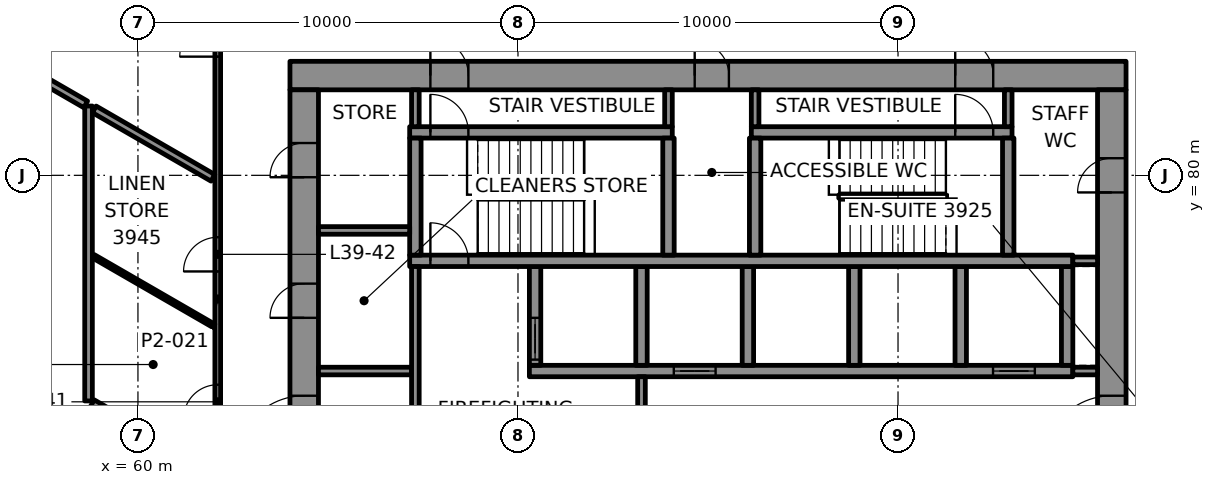
"""IFC4 building model, lengths in metres.
Left out: names, types, materials, properties, quantities, classifications, styles, units other than length and angle.
Written with IfcOpenShell. Run it as: python <this file> out.ifc"""

import sys

from ifc_helpers import new_model, si_unit, direction, frame, frame_2d, origin, place, context, subcontext, project, spatial, rectangle, extrude, element, fill, save


model = new_model("IFC4")
c1 = context("Model", 3, precision=1e-05, world=origin(), true_north=direction((0.0, 1.0)))
c2 = subcontext(c1, "Body", "Model", "MODEL_VIEW")
j1 = project(units=[si_unit("LENGTHUNIT", "METRE"), si_unit("PLANEANGLEUNIT", "RADIAN")], contexts=[c1])
p1 = place(None, origin())
s1 = spatial("IfcSite", under=j1, at=p1, CompositionType="ELEMENT")
p2 = place(p1, origin())
s2 = spatial("IfcBuilding", under=s1, at=p2, CompositionType="ELEMENT")
p3 = place(p2, frame((0.0, 0.0, 171.4)))
s3 = spatial("IfcBuildingStorey", under=s2, at=p3, CompositionType="ELEMENT", Elevation=171.4)
p4 = place(p3, frame((64.0, 82.625, 0.0), z_axis=(0.0, 0.0, 1.0), x_axis=(1.0, 0.0, 0.0)))
e1 = element("IfcWall", 1, at=p4, inside=s3, PredefinedType="SHEAR", context=c2, shape_type="SweptSolid", body=[
    extrude(rectangle(XDim=22.0, YDim=0.75, at=frame_2d((11.0, 0.0))), origin(), (0.0, 0.0, 1.0), 3.7),
])
p5 = place(p4, frame((3.695, 0.0, 0.0)))
e2 = element("IfcOpeningElement", 2, at=p5, cuts=e1, PredefinedType="OPENING", context=c2, shape_type="SweptSolid", body=[
    extrude(rectangle(XDim=1.0, YDim=2.1, at=frame_2d((0.5, 1.05))), frame((0.0, 0.385, 0.0), z_axis=(0.0, -1.0, 0.0), x_axis=(1.0, 0.0, 0.0)), (0.0, 0.0, 1.0), 0.77),
])
p6 = place(p4, frame((17.505, 0.0, 0.0)))
e3 = element("IfcOpeningElement", 3, at=p6, cuts=e1, PredefinedType="OPENING", context=c2, shape_type="SweptSolid", body=[
    extrude(rectangle(XDim=1.0, YDim=2.1, at=frame_2d((0.5, 1.05))), frame((0.0, 0.385, 0.0), z_axis=(0.0, -1.0, 0.0), x_axis=(1.0, 0.0, 0.0)), (0.0, 0.0, 1.0), 0.77),
])
p7 = place(p4, frame((10.65, 0.0, 0.0)))
e4 = element("IfcOpeningElement", 4, at=p7, cuts=e1, PredefinedType="OPENING", context=c2, shape_type="SweptSolid", body=[
    extrude(rectangle(XDim=0.9, YDim=2.1, at=frame_2d((0.45, 1.05))), frame((0.0, 0.385, 0.0), z_axis=(0.0, -1.0, 0.0), x_axis=(1.0, 0.0, 0.0)), (0.0, 0.0, 1.0), 0.77),
])
p8 = place(p3, frame((64.375, 67.75, 0.0), z_axis=(0.0, 0.0, 1.0), x_axis=(0.0, 1.0, 0.0)))
e5 = element("IfcWall", 5, at=p8, inside=s3, PredefinedType="SHEAR", context=c2, shape_type="SweptSolid", body=[
    extrude(rectangle(XDim=14.5, YDim=0.75, at=frame_2d((7.25, 0.0))), origin(), (0.0, 0.0, 1.0), 3.7),
])
p9 = place(p8, frame((4.65, 0.0, 0.0)))
e6 = element("IfcOpeningElement", 6, at=p9, cuts=e5, PredefinedType="OPENING", context=c2, shape_type="SweptSolid", body=[
    extrude(rectangle(XDim=1.8, YDim=2.1, at=frame_2d((0.9, 1.05))), frame((0.0, 0.385, 0.0), z_axis=(0.0, -1.0, 0.0), x_axis=(1.0, 0.0, 0.0)), (0.0, 0.0, 1.0), 0.77),
])
p10 = place(p8, frame((8.5, 0.0, 0.0)))
e7 = element("IfcOpeningElement", 7, at=p10, cuts=e5, PredefinedType="OPENING", context=c2, shape_type="SweptSolid", body=[
    extrude(rectangle(XDim=0.9, YDim=2.1, at=frame_2d((0.45, 1.05))), frame((0.0, 0.385, 0.0), z_axis=(0.0, -1.0, 0.0), x_axis=(1.0, 0.0, 0.0)), (0.0, 0.0, 1.0), 0.77),
])
p11 = place(p8, frame((12.2, 0.0, 0.0)))
e8 = element("IfcOpeningElement", 8, at=p11, cuts=e5, PredefinedType="OPENING", context=c2, shape_type="SweptSolid", body=[
    extrude(rectangle(XDim=0.9, YDim=2.1, at=frame_2d((0.45, 1.05))), frame((0.0, 0.385, 0.0), z_axis=(0.0, -1.0, 0.0), x_axis=(1.0, 0.0, 0.0)), (0.0, 0.0, 1.0), 0.77),
])
p12 = place(p3, frame((85.625, 67.75, 0.0), z_axis=(0.0, 0.0, 1.0), x_axis=(0.0, 1.0, 0.0)))
e9 = element("IfcWall", 9, at=p12, inside=s3, PredefinedType="SHEAR", context=c2, shape_type="SweptSolid", body=[
    extrude(rectangle(XDim=14.5, YDim=0.75, at=frame_2d((7.25, 0.0))), origin(), (0.0, 0.0, 1.0), 3.7),
])
p13 = place(p12, frame((4.65, 0.0, 0.0)))
e10 = element("IfcOpeningElement", 10, at=p13, cuts=e9, PredefinedType="OPENING", context=c2, shape_type="SweptSolid", body=[
    extrude(rectangle(XDim=1.8, YDim=2.1, at=frame_2d((0.9, 1.05))), frame((0.0, 0.385, 0.0), z_axis=(0.0, -1.0, 0.0), x_axis=(1.0, 0.0, 0.0)), (0.0, 0.0, 1.0), 0.77),
])
p14 = place(p12, frame((11.8, 0.0, 0.0)))
e11 = element("IfcOpeningElement", 11, at=p14, cuts=e9, PredefinedType="OPENING", context=c2, shape_type="SweptSolid", body=[
    extrude(rectangle(XDim=0.9, YDim=2.1, at=frame_2d((0.45, 1.05))), frame((0.0, 0.385, 0.0), z_axis=(0.0, -1.0, 0.0), x_axis=(1.0, 0.0, 0.0)), (0.0, 0.0, 1.0), 0.77),
])
p15 = place(p3, frame((70.3, 74.85, 0.0), z_axis=(0.0, 0.0, 1.0), x_axis=(1.0, 0.0, 0.0)))
e12 = element("IfcWall", 12, at=p15, inside=s3, PredefinedType="SHEAR", context=c2, shape_type="SweptSolid", body=[
    extrude(rectangle(XDim=14.3, YDim=0.3, at=frame_2d((7.15, 0.0))), origin(), (0.0, 0.0, 1.0), 3.7),
])
p16 = place(p15, frame((3.8, 0.0, 0.0)))
e13 = element("IfcOpeningElement", 13, at=p16, cuts=e12, PredefinedType="OPENING", context=c2, shape_type="SweptSolid", body=[
    extrude(rectangle(XDim=1.1, YDim=2.1, at=frame_2d((0.55, 1.05))), frame((0.0, 0.16, 0.0), z_axis=(0.0, -1.0, 0.0), x_axis=(1.0, 0.0, 0.0)), (0.0, 0.0, 1.0), 0.32),
])
p17 = place(p15, frame((12.2, 0.0, 0.0)))
e14 = element("IfcOpeningElement", 14, at=p17, cuts=e12, PredefinedType="OPENING", context=c2, shape_type="SweptSolid", body=[
    extrude(rectangle(XDim=1.1, YDim=2.1, at=frame_2d((0.55, 1.05))), frame((0.0, 0.16, 0.0), z_axis=(0.0, -1.0, 0.0), x_axis=(1.0, 0.0, 0.0)), (0.0, 0.0, 1.0), 0.32),
])
p18 = place(p3, frame((70.45, 75.0, 0.0), z_axis=(0.0, 0.0, 1.0), x_axis=(0.0, 1.0, 0.0)))
e15 = element("IfcWall", 15, at=p18, inside=s3, PredefinedType="SHEAR", context=c2, shape_type="SweptSolid", body=[
    extrude(rectangle(XDim=2.6, YDim=0.3, at=frame_2d((1.3, 0.0))), origin(), (0.0, 0.0, 1.0), 3.7),
])
p19 = place(p18, frame((0.15, 0.0, 0.0)))
e16 = element("IfcOpeningElement", 16, at=p19, cuts=e15, PredefinedType="OPENING", context=c2, shape_type="SweptSolid", body=[
    extrude(rectangle(XDim=1.1, YDim=2.1, at=frame_2d((0.55, 1.05))), frame((0.0, 0.16, 0.0), z_axis=(0.0, -1.0, 0.0), x_axis=(1.0, 0.0, 0.0)), (0.0, 0.0, 1.0), 0.32),
])
for number, where, z_axis, x_axis in (
    (17, (73.25, 75.0, 0.0), (0.0, 0.0, 1.0), (0.0, 1.0, 0.0)),
    (18, (76.05, 75.0, 0.0), (0.0, 0.0, 1.0), (0.0, 1.0, 0.0)),
    (19, (78.85, 75.0, 0.0), (0.0, 0.0, 1.0), (0.0, 1.0, 0.0)),
    (20, (81.65, 75.0, 0.0), (0.0, 0.0, 1.0), (0.0, 1.0, 0.0)),
    (21, (84.45, 75.0, 0.0), (0.0, 0.0, 1.0), (0.0, 1.0, 0.0)),
):
    element("IfcWall", number, at=place(p3, frame(where, z_axis=z_axis, x_axis=x_axis)), inside=s3, PredefinedType="SHEAR", context=c2, shape_type="SweptSolid", body=[
        extrude(rectangle(XDim=2.6, YDim=0.3, at=frame_2d((1.3, 0.0))), origin(), (0.0, 0.0, 1.0), 3.7),
    ])
p20 = place(p3, frame((67.15, 77.75, 0.0), z_axis=(0.0, 0.0, 1.0), x_axis=(1.0, 0.0, 0.0)))
e22 = element("IfcWall", 22, at=p20, inside=s3, PredefinedType="SHEAR", context=c2, shape_type="SweptSolid", body=[
    extrude(rectangle(XDim=17.45, YDim=0.3, at=frame_2d((8.725, 0.0))), origin(), (0.0, 0.0, 1.0), 3.7),
])
p21 = place(p20, frame((0.545, 0.0, 0.0)))
e23 = element("IfcOpeningElement", 23, at=p21, cuts=e22, PredefinedType="OPENING", context=c2, shape_type="SweptSolid", body=[
    extrude(rectangle(XDim=1.0, YDim=2.1, at=frame_2d((0.5, 1.05))), frame((0.0, 0.16, 0.0), z_axis=(0.0, -1.0, 0.0), x_axis=(1.0, 0.0, 0.0)), (0.0, 0.0, 1.0), 0.32),
])
p22 = place(p3, frame((67.15, 81.13, 0.0), z_axis=(0.0, 0.0, 1.0), x_axis=(1.0, 0.0, 0.0)))
e24 = element("IfcWall", 24, at=p22, inside=s3, PredefinedType="SHEAR", context=c2, shape_type="SweptSolid", body=[
    extrude(rectangle(XDim=6.91, YDim=0.3, at=frame_2d((3.455, 0.0))), origin(), (0.0, 0.0, 1.0), 3.7),
])
p23 = place(p22, frame((0.545, 0.0, 0.0)))
e25 = element("IfcOpeningElement", 25, at=p23, cuts=e24, PredefinedType="OPENING", context=c2, shape_type="SweptSolid", body=[
    extrude(rectangle(XDim=1.0, YDim=2.1, at=frame_2d((0.5, 1.05))), frame((0.0, 0.16, 0.0), z_axis=(0.0, -1.0, 0.0), x_axis=(1.0, 0.0, 0.0)), (0.0, 0.0, 1.0), 0.32),
])
p24 = place(p3, frame((76.14, 81.13, 0.0), z_axis=(0.0, 0.0, 1.0), x_axis=(1.0, 0.0, 0.0)))
e26 = element("IfcWall", 26, at=p24, inside=s3, PredefinedType="SHEAR", context=c2, shape_type="SweptSolid", body=[
    extrude(rectangle(XDim=6.86, YDim=0.3, at=frame_2d((3.43, 0.0))), origin(), (0.0, 0.0, 1.0), 3.7),
])
p25 = place(p24, frame((5.365, 0.0, 0.0)))
e27 = element("IfcOpeningElement", 27, at=p25, cuts=e26, PredefinedType="OPENING", context=c2, shape_type="SweptSolid", body=[
    extrude(rectangle(XDim=1.0, YDim=2.1, at=frame_2d((0.5, 1.05))), frame((0.0, 0.16, 0.0), z_axis=(0.0, -1.0, 0.0), x_axis=(1.0, 0.0, 0.0)), (0.0, 0.0, 1.0), 0.32),
])
for number, where, z_axis, x_axis in (
    (28, (67.3, 77.9, 0.0), (0.0, 0.0, 1.0), (0.0, 1.0, 0.0)),
    (29, (73.96, 77.9, 0.0), (0.0, 0.0, 1.0), (0.0, 1.0, 0.0)),
    (30, (76.24, 77.9, 0.0), (0.0, 0.0, 1.0), (0.0, 1.0, 0.0)),
    (31, (82.9, 77.9, 0.0), (0.0, 0.0, 1.0), (0.0, 1.0, 0.0)),
):
    element("IfcWall", number, at=place(p3, frame(where, z_axis=z_axis, x_axis=x_axis)), inside=s3, PredefinedType="SHEAR", context=c2, shape_type="SweptSolid", body=[
        extrude(rectangle(XDim=3.08, YDim=0.3, at=frame_2d((1.54, 0.0))), origin(), (0.0, 0.0, 1.0), 3.7),
    ])
p26 = place(p3, frame((62.1, 68.591, 0.0), z_axis=(0.0, 0.0, 1.0), x_axis=(0.0, 1.0, 0.0)))
e32 = element("IfcWall", 32, at=p26, inside=s3, PredefinedType="PARTITIONING", context=c2, shape_type="SweptSolid", body=[
    extrude(rectangle(XDim=16.308, YDim=0.15, at=frame_2d((8.154, 0.0))), origin(), (0.0, 0.0, 1.0), 3.1),
])
p27 = place(p26, frame((4.999, 0.0, 0.0)))
e33 = element("IfcOpeningElement", 33, at=p27, cuts=e32, PredefinedType="OPENING", context=c2, shape_type="SweptSolid", body=[
    extrude(rectangle(XDim=0.9, YDim=2.1, at=frame_2d((0.45, 1.05))), frame((0.0, 0.085, 0.0), z_axis=(0.0, -1.0, 0.0), x_axis=(1.0, 0.0, 0.0)), (0.0, 0.0, 1.0), 0.17),
])
p28 = place(p26, frame((8.879, 0.0, 0.0)))
e34 = element("IfcOpeningElement", 34, at=p28, cuts=e32, PredefinedType="OPENING", context=c2, shape_type="SweptSolid", body=[
    extrude(rectangle(XDim=0.9, YDim=2.1, at=frame_2d((0.45, 1.05))), frame((0.0, 0.085, 0.0), z_axis=(0.0, -1.0, 0.0), x_axis=(1.0, 0.0, 0.0)), (0.0, 0.0, 1.0), 0.17),
])
p29 = place(p26, frame((14.532, 0.0, 0.0)))
e35 = element("IfcOpeningElement", 35, at=p29, cuts=e32, PredefinedType="OPENING", context=c2, shape_type="SweptSolid", body=[
    extrude(rectangle(XDim=1.0, YDim=2.1, at=frame_2d((0.5, 1.05))), frame((0.0, 0.085, 0.0), z_axis=(0.0, -1.0, 0.0), x_axis=(1.0, 0.0, 0.0)), (0.0, 0.0, 1.0), 0.17),
])
p30 = place(p3, frame((58.7, 74.063, 0.0), z_axis=(0.0, 0.0, 1.0), x_axis=(0.0, 1.0, 0.0)))
e36 = element("IfcWall", 36, at=p30, inside=s3, PredefinedType="PARTITIONING", context=c2, shape_type="SweptSolid", body=[
    extrude(rectangle(XDim=7.76, YDim=0.2, at=frame_2d((3.88, 0.0))), origin(), (0.0, 0.0, 1.0), 3.1),
])
p31 = place(p3, frame((61.973, 79.934, 0.0), z_axis=(0.0, 0.0, 1.0), x_axis=(-0.866022099498, 0.500005723148, 0.0)))
e37 = element("IfcWall", 37, at=p31, inside=s3, PredefinedType="PARTITIONING", context=c2, shape_type="SweptSolid", body=[
    extrude(rectangle(XDim=3.606, YDim=0.2, at=frame_2d((1.803, 0.0))), origin(), (0.0, 0.0, 1.0), 3.1),
])
p32 = place(p3, frame((61.999, 76.039, 0.0), z_axis=(0.0, 0.0, 1.0), x_axis=(-0.866020252061, 0.500008922941, 0.0)))
e38 = element("IfcWall", 38, at=p32, inside=s3, PredefinedType="PARTITIONING", context=c2, shape_type="SweptSolid", body=[
    extrude(rectangle(XDim=3.664, YDim=0.1, at=frame_2d((1.832, 0.0))), origin(), (0.0, 0.0, 1.0), 3.1),
])
p33 = place(p3, frame((61.973, 72.173, 0.0), z_axis=(0.0, 0.0, 1.0), x_axis=(-0.866049104564, 0.499958946799, 0.0)))
e39 = element("IfcWall", 39, at=p33, inside=s3, PredefinedType="PARTITIONING", context=c2, shape_type="SweptSolid", body=[
    extrude(rectangle(XDim=3.664, YDim=0.2, at=frame_2d((1.832, 0.0))), origin(), (0.0, 0.0, 1.0), 3.1),
])
p34 = place(p3, frame((58.625, 81.867, 0.0), z_axis=(0.0, 0.0, 1.0), x_axis=(-0.866078449842, 0.499908110276, 0.0)))
e40 = element("IfcWall", 40, at=p34, inside=s3, PredefinedType="PARTITIONING", context=c2, shape_type="SweptSolid", body=[
    extrude(rectangle(XDim=2.125, YDim=0.2, at=frame_2d((1.062, 0.0))), origin(), (0.0, 0.0, 1.0), 3.022),
])
p35 = place(p3, frame((64.75, 74.85, 0.0), z_axis=(0.0, 0.0, 1.0), x_axis=(1.0, 0.0, 0.0)))
e41 = element("IfcWall", 41, at=p35, inside=s3, PredefinedType="PARTITIONING", context=c2, shape_type="SweptSolid", body=[
    extrude(rectangle(XDim=2.45, YDim=0.2, at=frame_2d((1.225, 0.0))), origin(), (0.0, 0.0, 1.0), 3.7),
])
for number, where, z_axis, x_axis in (
    (42, (84.6, 74.85, 0.0), (0.0, 0.0, 1.0), (1.0, 0.0, 0.0)),
    (43, (84.6, 77.75, 0.0), (0.0, 0.0, 1.0), (1.0, 0.0, 0.0)),
):
    element("IfcWall", number, at=place(p3, frame(where, z_axis=z_axis, x_axis=x_axis)), inside=s3, PredefinedType="PARTITIONING", context=c2, shape_type="SweptSolid", body=[
        extrude(rectangle(XDim=0.65, YDim=0.2, at=frame_2d((0.325, 0.0))), origin(), (0.0, 0.0, 1.0), 3.7),
    ])
p36 = place(p3, frame((64.75, 78.55, 0.0), z_axis=(0.0, 0.0, 1.0), x_axis=(1.0, 0.0, 0.0)))
e44 = element("IfcWall", 44, at=p36, inside=s3, PredefinedType="PARTITIONING", context=c2, shape_type="SweptSolid", body=[
    extrude(rectangle(XDim=2.4, YDim=0.2, at=frame_2d((1.2, 0.0))), origin(), (0.0, 0.0, 1.0), 3.7),
])
p37 = place(p3, frame((67.3, 71.85, 0.0), z_axis=(0.0, 0.0, 1.0), x_axis=(0.0, 1.0, 0.0)))
e45 = element("IfcWall", 45, at=p37, inside=s3, PredefinedType="PARTITIONING", context=c2, shape_type="SweptSolid", body=[
    extrude(rectangle(XDim=5.75, YDim=0.2, at=frame_2d((2.875, 0.0))), origin(), (0.0, 0.0, 1.0), 3.7),
])
p38 = place(p37, frame((0.85, 0.0, 0.0)))
e46 = element("IfcOpeningElement", 46, at=p38, cuts=e45, PredefinedType="OPENING", context=c2, shape_type="SweptSolid", body=[
    extrude(rectangle(XDim=1.2, YDim=2.1, at=frame_2d((0.6, 1.05))), frame((0.0, 0.11, 0.0), z_axis=(0.0, -1.0, 0.0), x_axis=(1.0, 0.0, 0.0)), (0.0, 0.0, 1.0), 0.22),
])
p39 = place(p3, frame((67.3, 81.28, 0.0), z_axis=(0.0, 0.0, 1.0), x_axis=(0.0, 1.0, 0.0)))
e47 = element("IfcWall", 47, at=p39, inside=s3, PredefinedType="PARTITIONING", context=c2, shape_type="SweptSolid", body=[
    extrude(rectangle(XDim=0.97, YDim=0.2, at=frame_2d((0.485, 0.0))), origin(), (0.0, 0.0, 1.0), 3.7),
])
p40 = place(p3, frame((73.25, 71.9, 0.0), z_axis=(0.0, 0.0, 1.0), x_axis=(0.0, 1.0, 0.0)))
e48 = element("IfcWall", 48, at=p40, inside=s3, PredefinedType="PARTITIONING", context=c2, shape_type="SweptSolid", body=[
    extrude(rectangle(XDim=2.8, YDim=0.2, at=frame_2d((1.4, 0.0))), origin(), (0.0, 0.0, 1.0), 3.7),
])
p41 = place(p40, frame((0.8, 0.0, 0.0)))
e49 = element("IfcOpeningElement", 49, at=p41, cuts=e48, PredefinedType="OPENING", context=c2, shape_type="SweptSolid", body=[
    extrude(rectangle(XDim=1.2, YDim=2.1, at=frame_2d((0.6, 1.05))), frame((0.0, 0.11, 0.0), z_axis=(0.0, -1.0, 0.0), x_axis=(1.0, 0.0, 0.0)), (0.0, 0.0, 1.0), 0.22),
])
for number, where, z_axis, x_axis in (
    (50, (73.96, 81.28, 0.0), (0.0, 0.0, 1.0), (0.0, 1.0, 0.0)),
    (51, (76.24, 81.28, 0.0), (0.0, 0.0, 1.0), (0.0, 1.0, 0.0)),
    (52, (82.9, 81.28, 0.0), (0.0, 0.0, 1.0), (0.0, 1.0, 0.0)),
):
    element("IfcWall", number, at=place(p3, frame(where, z_axis=z_axis, x_axis=x_axis)), inside=s3, PredefinedType="PARTITIONING", context=c2, shape_type="SweptSolid", body=[
        extrude(rectangle(XDim=0.97, YDim=0.2, at=frame_2d((0.485, 0.0))), origin(), (0.0, 0.0, 1.0), 3.7),
    ])
p42 = place(p27, origin())
e53 = element("IfcDoor", 53, at=p42, inside=s3, OperationType="SINGLE_SWING_LEFT", PredefinedType="DOOR", context=c2, shape_type="SweptSolid", body=[
    extrude(rectangle(XDim=0.9, YDim=2.1, at=frame_2d((0.45, 1.05))), frame((0.0, 0.025, 0.0), z_axis=(0.0, -1.0, 0.0), x_axis=(1.0, 0.0, 0.0)), (0.0, 0.0, 1.0), 0.05),
])
fill(e33, e53)
p43 = place(p28, origin())
e54 = element("IfcDoor", 54, at=p43, inside=s3, OperationType="SINGLE_SWING_RIGHT", PredefinedType="DOOR", context=c2, shape_type="SweptSolid", body=[
    extrude(rectangle(XDim=0.9, YDim=2.1, at=frame_2d((0.45, 1.05))), frame((0.0, 0.025, 0.0), z_axis=(0.0, -1.0, 0.0), x_axis=(1.0, 0.0, 0.0)), (0.0, 0.0, 1.0), 0.05),
])
fill(e34, e54)
p44 = place(p29, origin())
e55 = element("IfcDoor", 55, at=p44, inside=s3, OperationType="SINGLE_SWING_RIGHT", PredefinedType="DOOR", context=c2, shape_type="SweptSolid", body=[
    extrude(rectangle(XDim=1.0, YDim=2.1, at=frame_2d((0.5, 1.05))), frame((0.0, 0.025, 0.0), z_axis=(0.0, -1.0, 0.0), x_axis=(1.0, 0.0, 0.0)), (0.0, 0.0, 1.0), 0.05),
])
fill(e35, e55)
p45 = place(p19, origin())
e56 = element("IfcDoor", 56, at=p45, inside=s3, OperationType="DOUBLE_DOOR_SLIDING", PredefinedType="DOOR", context=c2, shape_type="SweptSolid", body=[
    extrude(rectangle(XDim=1.1, YDim=2.1, at=frame_2d((0.55, 1.05))), frame((0.0, 0.025, 0.0), z_axis=(0.0, -1.0, 0.0), x_axis=(1.0, 0.0, 0.0)), (0.0, 0.0, 1.0), 0.05),
])
fill(e16, e56)
p46 = place(p16, origin())
e57 = element("IfcDoor", 57, at=p46, inside=s3, OperationType="DOUBLE_DOOR_SLIDING", PredefinedType="DOOR", context=c2, shape_type="SweptSolid", body=[
    extrude(rectangle(XDim=1.1, YDim=2.1, at=frame_2d((0.55, 1.05))), frame((0.0, 0.025, 0.0), z_axis=(0.0, -1.0, 0.0), x_axis=(1.0, 0.0, 0.0)), (0.0, 0.0, 1.0), 0.05),
])
fill(e13, e57)
p47 = place(p17, origin())
e58 = element("IfcDoor", 58, at=p47, inside=s3, OperationType="DOUBLE_DOOR_SLIDING", PredefinedType="DOOR", context=c2, shape_type="SweptSolid", body=[
    extrude(rectangle(XDim=1.1, YDim=2.1, at=frame_2d((0.55, 1.05))), frame((0.0, 0.025, 0.0), z_axis=(0.0, -1.0, 0.0), x_axis=(1.0, 0.0, 0.0)), (0.0, 0.0, 1.0), 0.05),
])
fill(e14, e58)
p48 = place(p21, origin())
e59 = element("IfcDoor", 59, at=p48, inside=s3, OperationType="SINGLE_SWING_LEFT", PredefinedType="DOOR", context=c2, shape_type="SweptSolid", body=[
    extrude(rectangle(XDim=1.0, YDim=2.1, at=frame_2d((0.5, 1.05))), frame((0.0, 0.025, 0.0), z_axis=(0.0, -1.0, 0.0), x_axis=(1.0, 0.0, 0.0)), (0.0, 0.0, 1.0), 0.05),
])
fill(e23, e59)
p49 = place(p23, origin())
e60 = element("IfcDoor", 60, at=p49, inside=s3, OperationType="SINGLE_SWING_RIGHT", PredefinedType="DOOR", context=c2, shape_type="SweptSolid", body=[
    extrude(rectangle(XDim=1.0, YDim=2.1, at=frame_2d((0.5, 1.05))), frame((0.0, 0.025, 0.0), z_axis=(0.0, -1.0, 0.0), x_axis=(1.0, 0.0, 0.0)), (0.0, 0.0, 1.0), 0.05),
])
fill(e25, e60)
p50 = place(p5, origin())
e61 = element("IfcDoor", 61, at=p50, inside=s3, OperationType="SINGLE_SWING_LEFT", PredefinedType="DOOR", context=c2, shape_type="SweptSolid", body=[
    extrude(rectangle(XDim=1.0, YDim=2.1, at=frame_2d((0.5, 1.05))), frame((0.0, 0.095, 0.0), z_axis=(0.0, -1.0, 0.0), x_axis=(1.0, 0.0, 0.0)), (0.0, 0.0, 1.0), 0.19),
])
fill(e2, e61)
p51 = place(p25, origin())
e62 = element("IfcDoor", 62, at=p51, inside=s3, OperationType="SINGLE_SWING_RIGHT", PredefinedType="DOOR", context=c2, shape_type="SweptSolid", body=[
    extrude(rectangle(XDim=1.0, YDim=2.1, at=frame_2d((0.5, 1.05))), frame((0.0, 0.025, 0.0), z_axis=(0.0, -1.0, 0.0), x_axis=(1.0, 0.0, 0.0)), (0.0, 0.0, 1.0), 0.05),
])
fill(e27, e62)
p52 = place(p6, origin())
e63 = element("IfcDoor", 63, at=p52, inside=s3, OperationType="SINGLE_SWING_LEFT", PredefinedType="DOOR", context=c2, shape_type="SweptSolid", body=[
    extrude(rectangle(XDim=1.0, YDim=2.1, at=frame_2d((0.5, 1.05))), frame((0.0, 0.095, 0.0), z_axis=(0.0, -1.0, 0.0), x_axis=(1.0, 0.0, 0.0)), (0.0, 0.0, 1.0), 0.19),
])
fill(e3, e63)
p53 = place(p9, origin())
e64 = element("IfcDoor", 64, at=p53, inside=s3, OperationType="SINGLE_SWING_LEFT", PredefinedType="DOOR", context=c2, shape_type="SweptSolid", body=[
    extrude(rectangle(XDim=1.8, YDim=2.1, at=frame_2d((0.9, 1.05))), frame((0.0, 0.095, 0.0), z_axis=(0.0, -1.0, 0.0), x_axis=(1.0, 0.0, 0.0)), (0.0, 0.0, 1.0), 0.19),
])
fill(e6, e64)
p54 = place(p13, origin())
e65 = element("IfcDoor", 65, at=p54, inside=s3, OperationType="SINGLE_SWING_RIGHT", PredefinedType="DOOR", context=c2, shape_type="SweptSolid", body=[
    extrude(rectangle(XDim=1.8, YDim=2.1, at=frame_2d((0.9, 1.05))), frame((0.0, 0.095, 0.0), z_axis=(0.0, -1.0, 0.0), x_axis=(1.0, 0.0, 0.0)), (0.0, 0.0, 1.0), 0.19),
])
fill(e10, e65)
p55 = place(p10, origin())
e66 = element("IfcDoor", 66, at=p55, inside=s3, OperationType="SINGLE_SWING_RIGHT", PredefinedType="DOOR", context=c2, shape_type="SweptSolid", body=[
    extrude(rectangle(XDim=0.9, YDim=2.1, at=frame_2d((0.45, 1.05))), frame((0.0, 0.095, 0.0), z_axis=(0.0, -1.0, 0.0), x_axis=(1.0, 0.0, 0.0)), (0.0, 0.0, 1.0), 0.19),
])
fill(e7, e66)
p56 = place(p11, origin())
e67 = element("IfcDoor", 67, at=p56, inside=s3, OperationType="SINGLE_SWING_LEFT", PredefinedType="DOOR", context=c2, shape_type="SweptSolid", body=[
    extrude(rectangle(XDim=0.9, YDim=2.1, at=frame_2d((0.45, 1.05))), frame((0.0, 0.095, 0.0), z_axis=(0.0, -1.0, 0.0), x_axis=(1.0, 0.0, 0.0)), (0.0, 0.0, 1.0), 0.19),
])
fill(e8, e67)
p57 = place(p7, origin())
e68 = element("IfcDoor", 68, at=p57, inside=s3, OperationType="SINGLE_SWING_RIGHT", PredefinedType="DOOR", context=c2, shape_type="SweptSolid", body=[
    extrude(rectangle(XDim=0.9, YDim=2.1, at=frame_2d((0.45, 1.05))), frame((0.0, 0.095, 0.0), z_axis=(0.0, -1.0, 0.0), x_axis=(1.0, 0.0, 0.0)), (0.0, 0.0, 1.0), 0.19),
])
fill(e4, e68)
p58 = place(p14, origin())
e69 = element("IfcDoor", 69, at=p58, inside=s3, OperationType="SINGLE_SWING_LEFT", PredefinedType="DOOR", context=c2, shape_type="SweptSolid", body=[
    extrude(rectangle(XDim=0.9, YDim=2.1, at=frame_2d((0.45, 1.05))), frame((0.0, 0.095, 0.0), z_axis=(0.0, -1.0, 0.0), x_axis=(1.0, 0.0, 0.0)), (0.0, 0.0, 1.0), 0.19),
])
fill(e11, e69)
save(model, sys.argv[1])
